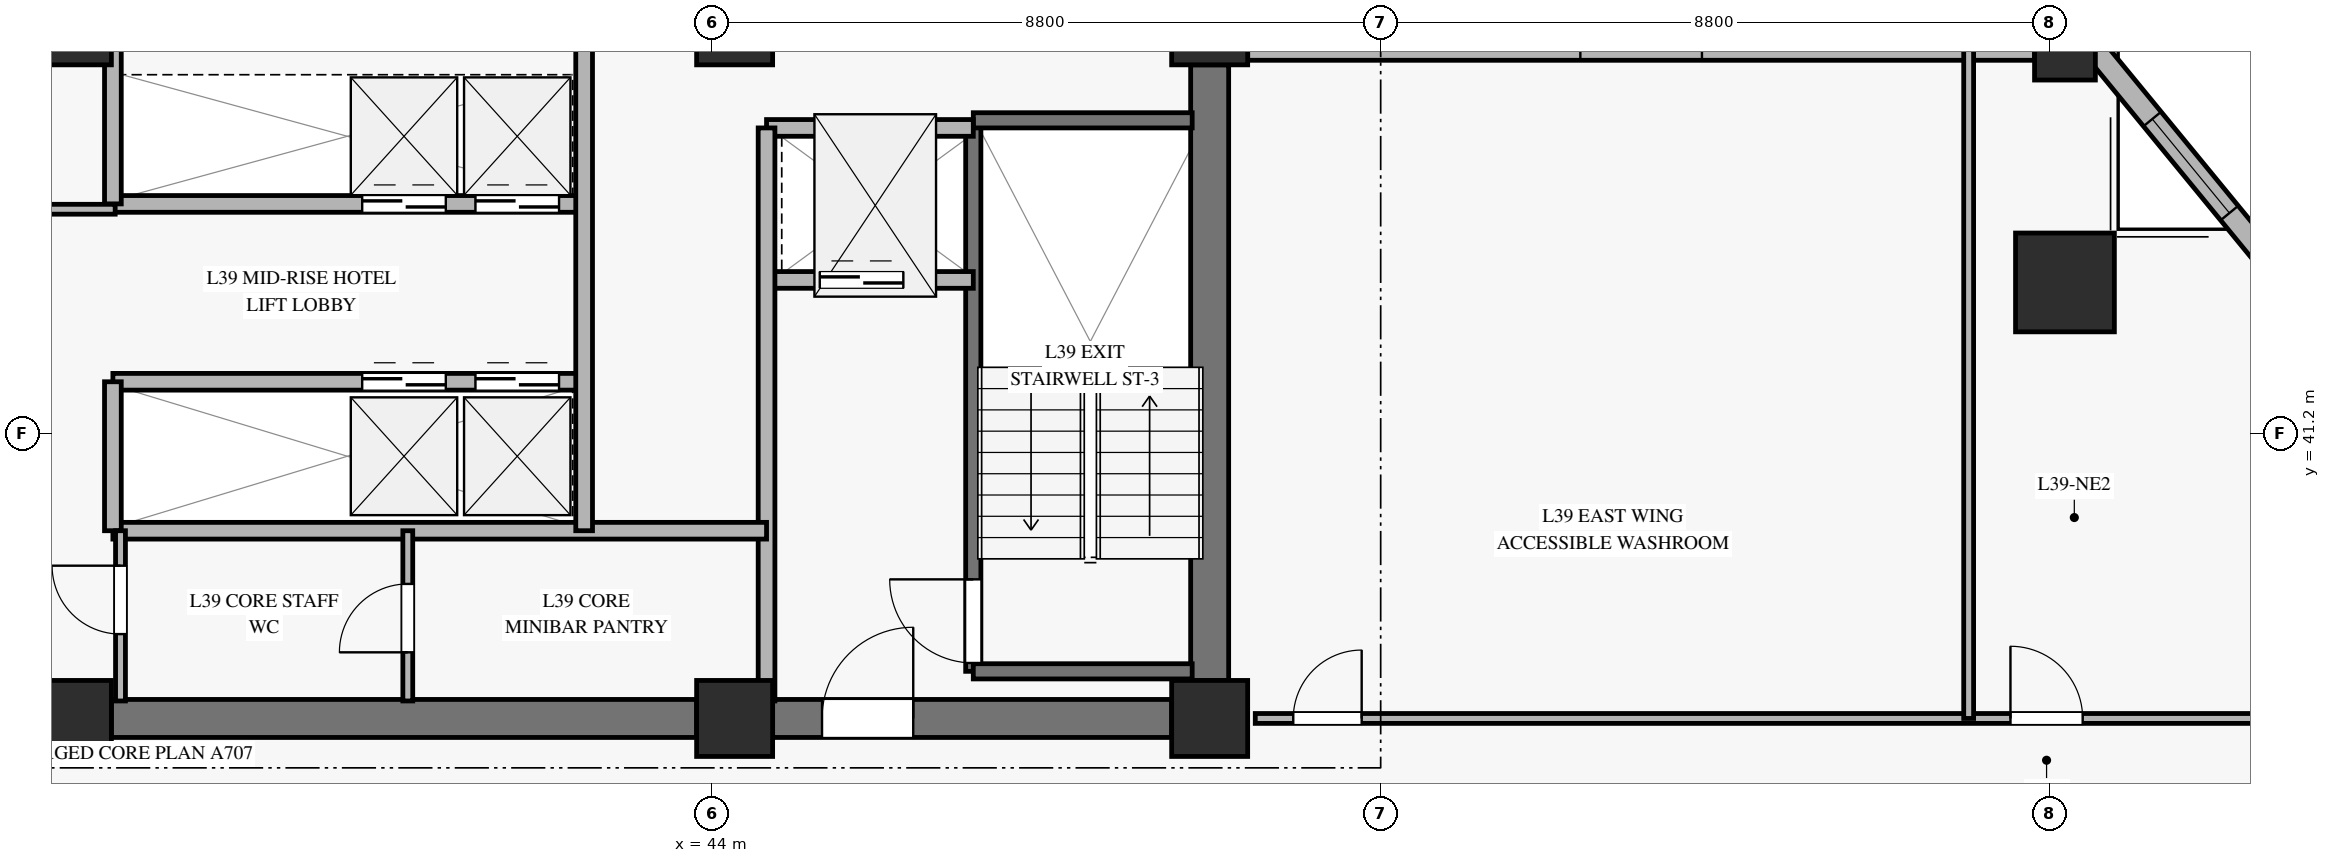
"""IFC4 building model, lengths in metres.
Left out: names, types, materials, properties, quantities, classifications, styles, units other than length and angle.
Written with IfcOpenShell. Run it as: python <this file> out.ifc"""

import sys

from ifc_helpers import new_model, si_unit, direction, frame, frame_2d, origin, origin_2d, place, context, subcontext, project, spatial, rectangle, hollow_rectangle, extrude, source, transform, mapped, element, fill, save


model = new_model("IFC4")
c1 = context("Model", 3, precision=1e-05, world=origin(), true_north=direction((0.0, 1.0)))
c2 = subcontext(c1, "Body", "Model", "MODEL_VIEW")
j1 = project(units=[si_unit("LENGTHUNIT", "METRE"), si_unit("PLANEANGLEUNIT", "RADIAN")], contexts=[c1])
p1 = place(None, origin())
s1 = spatial("IfcSite", under=j1, at=p1, CompositionType="ELEMENT")
p2 = place(p1, origin())
s2 = spatial("IfcBuilding", under=s1, at=p2, CompositionType="ELEMENT")
p3 = place(p2, frame((0.0, 0.0, 159.7)))
s3 = spatial("IfcBuildingStorey", under=s2, at=p3, CompositionType="ELEMENT", Elevation=159.7)
m1 = source(origin(), c2, "Body", "SweptSolid", [
    extrude(rectangle(XDim=1.0, YDim=1.0, at=origin_2d()), origin(), (0.0, 0.0, 1.0), 3.27),
])
for number, where, z_axis, x_axis in (
    (1, (35.6, 37.45, 0.0), (0.0, 0.0, 1.0), (1.0, 0.0, 0.0)),
    (2, (35.6, 46.55, 0.0), (0.0, 0.0, 1.0), (1.0, 0.0, 0.0)),
    (3, (44.3, 37.45, 0.0), (0.0, 0.0, 1.0), (1.0, 0.0, 0.0)),
    (4, (44.3, 46.55, 0.0), (0.0, 0.0, 1.0), (1.0, 0.0, 0.0)),
    (5, (50.55, 37.45, 0.0), (0.0, 0.0, 1.0), (1.0, 0.0, 0.0)),
    (6, (50.55, 46.55, 0.0), (0.0, 0.0, 1.0), (1.0, 0.0, 0.0)),
):
    element("IfcColumn", number, at=place(p3, frame(where, z_axis=z_axis, x_axis=x_axis)), inside=s3, PredefinedType="PILASTER", context=c2, shape_type="MappedRepresentation", body=[
        mapped(m1, transform((0.0, 0.0, 0.0), x_axis=(1.0, 0.0, 0.0), y_axis=(0.0, 1.0, 0.0), z_axis=(0.0, 0.0, 1.0), scale=1.0)),
    ])
p4 = place(p3, frame((36.1, 37.45, 0.0), z_axis=(0.0, 0.0, 1.0), x_axis=(1.0, 0.0, 0.0)))
e7 = element("IfcWall", 7, at=p4, inside=s3, PredefinedType="SHEAR", context=c2, shape_type="SweptSolid", body=[
    extrude(rectangle(XDim=7.7, YDim=0.5, at=frame_2d((3.85, 0.0))), origin(), (0.0, 0.0, 1.0), 3.27),
])
p5 = place(p3, frame((44.8, 37.45, 0.0), z_axis=(0.0, 0.0, 1.0), x_axis=(1.0, 0.0, 0.0)))
e8 = element("IfcWall", 8, at=p5, inside=s3, PredefinedType="SHEAR", context=c2, shape_type="SweptSolid", body=[
    extrude(rectangle(XDim=5.25, YDim=0.5, at=frame_2d((2.625, 0.0))), origin(), (0.0, 0.0, 1.0), 3.27),
])
p6 = place(p5, frame((0.65, 0.0, 0.0)))
e9 = element("IfcOpeningElement", 9, at=p6, cuts=e8, PredefinedType="OPENING", context=c2, shape_type="SweptSolid", body=[
    extrude(rectangle(XDim=1.2, YDim=2.15, at=frame_2d((0.6, 1.075))), frame((0.0, 0.26, 0.0), z_axis=(0.0, -1.0, 0.0), x_axis=(1.0, 0.0, 0.0)), (0.0, 0.0, 1.0), 0.52),
])
p7 = place(p3, frame((50.55, 37.95, 0.0), z_axis=(0.0, 0.0, 1.0), x_axis=(0.0, 1.0, 0.0)))
e10 = element("IfcWall", 10, at=p7, inside=s3, PredefinedType="SHEAR", context=c2, shape_type="SweptSolid", body=[
    extrude(rectangle(XDim=8.1, YDim=0.5, at=frame_2d((4.05, 0.0))), origin(), (0.0, 0.0, 1.0), 3.27),
])
m2 = source(origin(), c2, "Body", "SweptSolid", [
    extrude(hollow_rectangle(XDim=1.3, YDim=1.3, WallThickness=0.06, at=origin_2d()), origin(), (0.0, 0.0, 1.0), 3.27),
])
p8 = place(p3, frame((61.803, 43.187, 0.0), z_axis=(0.0, 0.0, 1.0), x_axis=(1.0, 0.0, 0.0)))
e11 = element("IfcColumn", 11, at=p8, inside=s3, PredefinedType="COLUMN", context=c2, shape_type="MappedRepresentation", body=[
    mapped(m2, transform((0.0, 0.0, 0.0), x_axis=(1.0, 0.0, 0.0), y_axis=(0.0, 1.0, 0.0), z_axis=(0.0, 0.0, 1.0), scale=1.0)),
])
m3 = source(origin(), c2, "Body", "SweptSolid", [
    extrude(hollow_rectangle(XDim=0.8, YDim=0.8, WallThickness=0.036, at=origin_2d()), origin(), (0.0, 0.0, 1.0), 3.27),
])
p9 = place(p3, frame((61.803, 46.25, 0.0), z_axis=(0.0, 0.0, 1.0), x_axis=(1.0, 0.0, 0.0)))
e12 = element("IfcColumn", 12, at=p9, inside=s3, PredefinedType="COLUMN", context=c2, shape_type="MappedRepresentation", body=[
    mapped(m3, transform((0.0, 0.0, 0.0), x_axis=(1.0, 0.0, 0.0), y_axis=(0.0, 1.0, 0.0), z_axis=(0.0, 0.0, 1.0), scale=1.0)),
])
p10 = place(p3, frame((51.05, 46.25, 0.0), z_axis=(0.0, 0.0, 1.0), x_axis=(1.0, 0.0, 0.0)))
e13 = element("IfcWall", 13, at=p10, inside=s3, PredefinedType="SOLIDWALL", context=c2, shape_type="SweptSolid", body=[
    extrude(rectangle(XDim=10.353, YDim=0.28, at=frame_2d((5.177, 0.0))), origin(), (0.0, 0.0, 1.0), 2.75),
])
p11 = place(p10, frame((4.377, 0.0, 0.45)))
e14 = element("IfcOpeningElement", 14, at=p11, cuts=e13, PredefinedType="OPENING", context=c2, shape_type="SweptSolid", body=[
    extrude(rectangle(XDim=1.6, YDim=2.0, at=frame_2d((0.8, 1.0))), frame((0.0, 0.15, 0.0), z_axis=(0.0, -1.0, 0.0), x_axis=(1.0, 0.0, 0.0)), (0.0, 0.0, 1.0), 0.3),
])
p12 = place(p3, frame((64.716, 43.187, 0.0), z_axis=(0.0, 0.0, 1.0), x_axis=(-0.634310946058, 0.773078019161, 0.0)))
e15 = element("IfcWall", 15, at=p12, inside=s3, PredefinedType="SOLIDWALL", context=c2, shape_type="SweptSolid", body=[
    extrude(rectangle(XDim=3.962, YDim=0.3, at=frame_2d((1.981, 0.0))), origin(), (0.0, 0.0, 1.0), 2.75),
])
p13 = place(p12, frame((1.181, 0.0, 0.45)))
e16 = element("IfcOpeningElement", 16, at=p13, cuts=e15, PredefinedType="OPENING", context=c2, shape_type="SweptSolid", body=[
    extrude(rectangle(XDim=1.6, YDim=2.0, at=frame_2d((0.8, 1.0))), frame((0.0, 0.16, 0.0), z_axis=(0.0, -1.0, 0.0), x_axis=(1.0, 0.0, 0.0)), (0.0, 0.0, 1.0), 0.32),
])
p14 = place(p3, frame((47.44, 38.07, 0.0), z_axis=(0.0, 0.0, 1.0), x_axis=(0.0, 1.0, 0.0)))
e17 = element("IfcWall", 17, at=p14, inside=s3, PredefinedType="SOLIDWALL", context=c2, shape_type="SweptSolid", body=[
    extrude(rectangle(XDim=7.25, YDim=0.2, at=frame_2d((3.625, 0.0))), origin(), (0.0, 0.0, 1.0), 3.5),
])
p15 = place(p14, frame((0.11, 0.0, 0.0)))
e18 = element("IfcOpeningElement", 18, at=p15, cuts=e17, PredefinedType="OPENING", context=c2, shape_type="SweptSolid", body=[
    extrude(rectangle(XDim=1.1, YDim=2.15, at=frame_2d((0.55, 1.075))), frame((0.0, 0.11, 0.0), z_axis=(0.0, -1.0, 0.0), x_axis=(1.0, 0.0, 0.0)), (0.0, 0.0, 1.0), 0.22),
])
for number, where, z_axis, x_axis in (
    (19, (47.44, 45.32, 0.0), (0.0, 0.0, 1.0), (1.0, 0.0, 0.0)),
    (20, (47.44, 38.07, 0.0), (0.0, 0.0, 1.0), (1.0, 0.0, 0.0)),
):
    element("IfcWall", number, at=place(p3, frame(where, z_axis=z_axis, x_axis=x_axis)), inside=s3, PredefinedType="SOLIDWALL", context=c2, shape_type="SweptSolid", body=[
        extrude(rectangle(XDim=2.88, YDim=0.2, at=frame_2d((1.44, 0.0))), origin(), (0.0, 0.0, 1.0), 3.5),
    ])
p16 = place(p3, frame((44.72, 43.22, 0.0), z_axis=(0.0, 0.0, 1.0), x_axis=(1.0, 0.0, 0.0)))
e21 = element("IfcWall", 21, at=p16, inside=s3, PredefinedType="SOLIDWALL", context=c2, shape_type="SweptSolid", body=[
    extrude(rectangle(XDim=2.72, YDim=0.22, at=frame_2d((1.36, 0.0))), origin(), (0.0, 0.0, 1.0), 3.27),
])
p17 = place(p16, frame((0.7, 0.0, 0.0)))
e22 = element("IfcOpeningElement", 22, at=p17, cuts=e21, PredefinedType="OPENING", context=c2, shape_type="SweptSolid", body=[
    extrude(rectangle(XDim=1.1, YDim=2.2, at=frame_2d((0.55, 1.1))), frame((0.0, 0.12, 0.0), z_axis=(0.0, -1.0, 0.0), x_axis=(1.0, 0.0, 0.0)), (0.0, 0.0, 1.0), 0.24),
])
p18 = place(p3, frame((44.72, 45.22, 0.0), z_axis=(0.0, 0.0, 1.0), x_axis=(1.0, 0.0, 0.0)))
e23 = element("IfcWall", 23, at=p18, inside=s3, PredefinedType="SOLIDWALL", context=c2, shape_type="SweptSolid", body=[
    extrude(rectangle(XDim=2.72, YDim=0.22, at=frame_2d((1.36, 0.0))), origin(), (0.0, 0.0, 1.0), 3.27),
])
p19 = place(p3, frame((44.72, 37.68, 0.0), z_axis=(0.0, 0.0, 1.0), x_axis=(0.0, 1.0, 0.0)))
e24 = element("IfcWall", 24, at=p19, inside=s3, PredefinedType="SOLIDWALL", context=c2, shape_type="SweptSolid", body=[
    extrude(rectangle(XDim=7.54, YDim=0.22, at=frame_2d((3.77, 0.0))), origin(), (0.0, 0.0, 1.0), 3.27),
])
p20 = place(p3, frame((36.12, 44.22, 0.0), z_axis=(0.0, 0.0, 1.0), x_axis=(1.0, 0.0, 0.0)))
e25 = element("IfcWall", 25, at=p20, inside=s3, PredefinedType="SOLIDWALL", context=c2, shape_type="SweptSolid", body=[
    extrude(rectangle(XDim=6.2, YDim=0.22, at=frame_2d((3.1, 0.0))), origin(), (0.0, 0.0, 1.0), 3.27),
])
p21 = place(p20, frame((3.28, 0.0, 0.0)))
e26 = element("IfcOpeningElement", 26, at=p21, cuts=e25, PredefinedType="OPENING", context=c2, shape_type="SweptSolid", body=[
    extrude(rectangle(XDim=1.1, YDim=2.2, at=frame_2d((0.55, 1.1))), frame((0.0, 0.12, 0.0), z_axis=(0.0, -1.0, 0.0), x_axis=(1.0, 0.0, 0.0)), (0.0, 0.0, 1.0), 0.24),
])
p22 = place(p20, frame((4.77, 0.0, 0.0)))
e27 = element("IfcOpeningElement", 27, at=p22, cuts=e25, PredefinedType="OPENING", context=c2, shape_type="SweptSolid", body=[
    extrude(rectangle(XDim=1.1, YDim=2.2, at=frame_2d((0.55, 1.1))), frame((0.0, 0.12, 0.0), z_axis=(0.0, -1.0, 0.0), x_axis=(1.0, 0.0, 0.0)), (0.0, 0.0, 1.0), 0.24),
])
p23 = place(p3, frame((36.12, 41.88, 0.0), z_axis=(0.0, 0.0, 1.0), x_axis=(1.0, 0.0, 0.0)))
e28 = element("IfcWall", 28, at=p23, inside=s3, PredefinedType="SOLIDWALL", context=c2, shape_type="SweptSolid", body=[
    extrude(rectangle(XDim=6.2, YDim=0.22, at=frame_2d((3.1, 0.0))), origin(), (0.0, 0.0, 1.0), 3.27),
])
p24 = place(p23, frame((3.28, 0.0, 0.0)))
e29 = element("IfcOpeningElement", 29, at=p24, cuts=e28, PredefinedType="OPENING", context=c2, shape_type="SweptSolid", body=[
    extrude(rectangle(XDim=1.1, YDim=2.2, at=frame_2d((0.55, 1.1))), frame((0.0, 0.12, 0.0), z_axis=(0.0, -1.0, 0.0), x_axis=(1.0, 0.0, 0.0)), (0.0, 0.0, 1.0), 0.24),
])
p25 = place(p23, frame((4.77, 0.0, 0.0)))
e30 = element("IfcOpeningElement", 30, at=p25, cuts=e28, PredefinedType="OPENING", context=c2, shape_type="SweptSolid", body=[
    extrude(rectangle(XDim=1.1, YDim=2.2, at=frame_2d((0.55, 1.1))), frame((0.0, 0.12, 0.0), z_axis=(0.0, -1.0, 0.0), x_axis=(1.0, 0.0, 0.0)), (0.0, 0.0, 1.0), 0.24),
])
p26 = place(p3, frame((36.12, 39.92, 0.0), z_axis=(0.0, 0.0, 1.0), x_axis=(1.0, 0.0, 0.0)))
e31 = element("IfcWall", 31, at=p26, inside=s3, PredefinedType="SOLIDWALL", context=c2, shape_type="SweptSolid", body=[
    extrude(rectangle(XDim=8.6, YDim=0.22, at=frame_2d((4.3, 0.0))), origin(), (0.0, 0.0, 1.0), 2.555),
])
p27 = place(p3, frame((42.32, 39.92, 0.0), z_axis=(0.0, 0.0, 1.0), x_axis=(0.0, 1.0, 0.0)))
e32 = element("IfcWall", 32, at=p27, inside=s3, PredefinedType="SOLIDWALL", context=c2, shape_type="SweptSolid", body=[
    extrude(rectangle(XDim=6.4, YDim=0.22, at=frame_2d((3.2, 0.0))), origin(), (0.0, 0.0, 1.0), 3.27),
])
p28 = place(p3, frame((36.12, 39.92, 0.0), z_axis=(0.0, 0.0, 1.0), x_axis=(0.0, 1.0, 0.0)))
e33 = element("IfcWall", 33, at=p28, inside=s3, PredefinedType="SOLIDWALL", context=c2, shape_type="SweptSolid", body=[
    extrude(rectangle(XDim=1.96, YDim=0.22, at=frame_2d((0.98, 0.0))), origin(), (0.0, 0.0, 1.0), 3.27),
])
p29 = place(p3, frame((36.12, 44.22, 0.0), z_axis=(0.0, 0.0, 1.0), x_axis=(0.0, 1.0, 0.0)))
e34 = element("IfcWall", 34, at=p29, inside=s3, PredefinedType="SOLIDWALL", context=c2, shape_type="SweptSolid", body=[
    extrude(rectangle(XDim=2.1, YDim=0.22, at=frame_2d((1.05, 0.0))), origin(), (0.0, 0.0, 1.0), 3.27),
])
p30 = place(p3, frame((33.18, 44.15, 0.0), z_axis=(0.0, 0.0, 1.0), x_axis=(1.0, 0.0, 0.0)))
e35 = element("IfcWall", 35, at=p30, inside=s3, PredefinedType="PARTITIONING", context=c2, shape_type="SweptSolid", body=[
    extrude(rectangle(XDim=2.97, YDim=0.13, at=frame_2d((1.485, 0.0))), origin(), (0.0, 0.0, 1.0), 2.555),
])
p31 = place(p3, frame((36.22, 37.68, 0.0), z_axis=(0.0, 0.0, 1.0), x_axis=(0.0, 1.0, 0.0)))
e36 = element("IfcWall", 36, at=p31, inside=s3, PredefinedType="PARTITIONING", context=c2, shape_type="SweptSolid", body=[
    extrude(rectangle(XDim=2.24, YDim=0.13, at=frame_2d((1.12, 0.0))), origin(), (0.0, 0.0, 1.0), 3.27),
])
p32 = place(p31, frame((0.88, 0.0, 0.0)))
e37 = element("IfcOpeningElement", 37, at=p32, cuts=e36, PredefinedType="OPENING", context=c2, shape_type="SweptSolid", body=[
    extrude(rectangle(XDim=0.9, YDim=2.1, at=frame_2d((0.45, 1.05))), frame((0.0, 0.075, 0.0), z_axis=(0.0, -1.0, 0.0), x_axis=(1.0, 0.0, 0.0)), (0.0, 0.0, 1.0), 0.15),
])
p33 = place(p3, frame((40.0, 37.68, 0.0), z_axis=(0.0, 0.0, 1.0), x_axis=(0.0, 1.0, 0.0)))
e38 = element("IfcWall", 38, at=p33, inside=s3, PredefinedType="PARTITIONING", context=c2, shape_type="SweptSolid", body=[
    extrude(rectangle(XDim=2.24, YDim=0.13, at=frame_2d((1.12, 0.0))), origin(), (0.0, 0.0, 1.0), 3.27),
])
p34 = place(p33, frame((0.64, 0.0, 0.0)))
e39 = element("IfcOpeningElement", 39, at=p34, cuts=e38, PredefinedType="OPENING", context=c2, shape_type="SweptSolid", body=[
    extrude(rectangle(XDim=0.9, YDim=2.1, at=frame_2d((0.45, 1.05))), frame((0.0, 0.075, 0.0), z_axis=(0.0, -1.0, 0.0), x_axis=(1.0, 0.0, 0.0)), (0.0, 0.0, 1.0), 0.15),
])
p35 = place(p3, frame((51.15, 37.45, 0.0), z_axis=(0.0, 0.0, 1.0), x_axis=(1.0, 0.0, 0.0)))
e40 = element("IfcWall", 40, at=p35, inside=s3, PredefinedType="PARTITIONING", context=c2, shape_type="SweptSolid", body=[
    extrude(rectangle(XDim=13.566, YDim=0.13, at=frame_2d((6.783, 0.0))), origin(), (0.0, 0.0, 1.0), 2.755),
])
p36 = place(p35, frame((0.5, 0.0, 0.0)))
e41 = element("IfcOpeningElement", 41, at=p36, cuts=e40, PredefinedType="OPENING", context=c2, shape_type="SweptSolid", body=[
    extrude(rectangle(XDim=0.9, YDim=2.1, at=frame_2d((0.45, 1.05))), frame((0.0, 0.075, 0.0), z_axis=(0.0, -1.0, 0.0), x_axis=(1.0, 0.0, 0.0)), (0.0, 0.0, 1.0), 0.15),
])
p37 = place(p35, frame((9.936, 0.0, 0.0)))
e42 = element("IfcOpeningElement", 42, at=p37, cuts=e40, PredefinedType="OPENING", context=c2, shape_type="SweptSolid", body=[
    extrude(rectangle(XDim=0.95, YDim=2.1, at=frame_2d((0.475, 1.05))), frame((0.0, 0.075, 0.0), z_axis=(0.0, -1.0, 0.0), x_axis=(1.0, 0.0, 0.0)), (0.0, 0.0, 1.0), 0.15),
])
p38 = place(p3, frame((60.536, 37.45, 0.0), z_axis=(0.0, 0.0, 1.0), x_axis=(0.0, 1.0, 0.0)))
e43 = element("IfcWall", 43, at=p38, inside=s3, PredefinedType="PARTITIONING", context=c2, shape_type="SweptSolid", body=[
    extrude(rectangle(XDim=8.8, YDim=0.13, at=frame_2d((4.4, 0.0))), origin(), (0.0, 0.0, 1.0), 3.27),
])
m4 = source(origin(), c2, "Body", "SweptSolid", [
    extrude(rectangle(XDim=1.6, YDim=2.0, at=frame_2d((0.8, 1.0))), frame((0.0, 0.03, 0.0), z_axis=(0.0, -1.0, 0.0), x_axis=(1.0, 0.0, 0.0)), (0.0, 0.0, 1.0), 0.06),
])
p39 = place(p13, origin())
e44 = element("IfcWindow", 44, at=p39, inside=s3, PartitioningType="SINGLE_PANEL", PredefinedType="WINDOW", context=c2, shape_type="MappedRepresentation", body=[
    mapped(m4, transform((0.0, 0.0, 0.0), x_axis=(1.0, 0.0, 0.0), y_axis=(0.0, 1.0, 0.0), z_axis=(0.0, 0.0, 1.0), scale=1.0)),
])
fill(e16, e44)
m5 = source(origin(), c2, "Body", "SweptSolid", [
    extrude(rectangle(XDim=1.1, YDim=2.15, at=frame_2d((0.55, 1.075))), frame((0.0, 0.025, 0.0), z_axis=(0.0, -1.0, 0.0), x_axis=(1.0, 0.0, 0.0)), (0.0, 0.0, 1.0), 0.05),
])
p40 = place(p15, origin())
e45 = element("IfcDoor", 45, at=p40, inside=s3, OperationType="SINGLE_SWING_RIGHT", PredefinedType="DOOR", context=c2, shape_type="MappedRepresentation", body=[
    mapped(m5, transform((0.0, 0.0, 0.0), x_axis=(1.0, 0.0, 0.0), y_axis=(0.0, 1.0, 0.0), z_axis=(0.0, 0.0, 1.0), scale=1.0)),
])
fill(e18, e45)
m6 = source(origin(), c2, "Body", "SweptSolid", [
    extrude(rectangle(XDim=1.1, YDim=2.2, at=frame_2d((0.55, 1.1))), frame((0.0, 0.025, 0.0), z_axis=(0.0, -1.0, 0.0), x_axis=(1.0, 0.0, 0.0)), (0.0, 0.0, 1.0), 0.05),
])
p41 = place(p17, origin())
e46 = element("IfcDoor", 46, at=p41, inside=s3, OperationType="SLIDING_TO_LEFT", PredefinedType="DOOR", context=c2, shape_type="MappedRepresentation", body=[
    mapped(m6, transform((0.0, 0.0, 0.0), x_axis=(1.0, 0.0, 0.0), y_axis=(0.0, 1.0, 0.0), z_axis=(0.0, 0.0, 1.0), scale=1.0)),
])
fill(e22, e46)
m7 = source(origin(), c2, "Body", "SweptSolid", [
    extrude(rectangle(XDim=1.2, YDim=2.15, at=frame_2d((0.6, 1.075))), frame((0.0, 0.025, 0.0), z_axis=(0.0, -1.0, 0.0), x_axis=(1.0, 0.0, 0.0)), (0.0, 0.0, 1.0), 0.05),
])
p42 = place(p6, origin())
e47 = element("IfcDoor", 47, at=p42, inside=s3, OperationType="SINGLE_SWING_RIGHT", PredefinedType="DOOR", context=c2, shape_type="MappedRepresentation", body=[
    mapped(m7, transform((0.0, 0.0, 0.0), x_axis=(1.0, 0.0, 0.0), y_axis=(0.0, 1.0, 0.0), z_axis=(0.0, 0.0, 1.0), scale=1.0)),
])
fill(e9, e47)
p43 = place(p21, origin())
e48 = element("IfcDoor", 48, at=p43, inside=s3, OperationType="SLIDING_TO_LEFT", PredefinedType="DOOR", context=c2, shape_type="MappedRepresentation", body=[
    mapped(m6, transform((0.0, 0.0, 0.0), x_axis=(1.0, 0.0, 0.0), y_axis=(0.0, 1.0, 0.0), z_axis=(0.0, 0.0, 1.0), scale=1.0)),
])
fill(e26, e48)
p44 = place(p22, origin())
e49 = element("IfcDoor", 49, at=p44, inside=s3, OperationType="SLIDING_TO_LEFT", PredefinedType="DOOR", context=c2, shape_type="MappedRepresentation", body=[
    mapped(m6, transform((0.0, 0.0, 0.0), x_axis=(1.0, 0.0, 0.0), y_axis=(0.0, 1.0, 0.0), z_axis=(0.0, 0.0, 1.0), scale=1.0)),
])
fill(e27, e49)
p45 = place(p24, origin())
e50 = element("IfcDoor", 50, at=p45, inside=s3, OperationType="SLIDING_TO_LEFT", PredefinedType="DOOR", context=c2, shape_type="MappedRepresentation", body=[
    mapped(m6, transform((0.0, 0.0, 0.0), x_axis=(1.0, 0.0, 0.0), y_axis=(0.0, 1.0, 0.0), z_axis=(0.0, 0.0, 1.0), scale=1.0)),
])
fill(e29, e50)
p46 = place(p25, origin())
e51 = element("IfcDoor", 51, at=p46, inside=s3, OperationType="SLIDING_TO_LEFT", PredefinedType="DOOR", context=c2, shape_type="MappedRepresentation", body=[
    mapped(m6, transform((0.0, 0.0, 0.0), x_axis=(1.0, 0.0, 0.0), y_axis=(0.0, 1.0, 0.0), z_axis=(0.0, 0.0, 1.0), scale=1.0)),
])
fill(e30, e51)
m8 = source(origin(), c2, "Body", "SweptSolid", [
    extrude(rectangle(XDim=0.9, YDim=2.1, at=frame_2d((0.45, 1.05))), frame((0.0, 0.025, 0.0), z_axis=(0.0, -1.0, 0.0), x_axis=(1.0, 0.0, 0.0)), (0.0, 0.0, 1.0), 0.05),
])
p47 = place(p32, origin())
e52 = element("IfcDoor", 52, at=p47, inside=s3, OperationType="SINGLE_SWING_RIGHT", PredefinedType="DOOR", context=c2, shape_type="MappedRepresentation", body=[
    mapped(m8, transform((0.0, 0.0, 0.0), x_axis=(1.0, 0.0, 0.0), y_axis=(0.0, 1.0, 0.0), z_axis=(0.0, 0.0, 1.0), scale=1.0)),
])
fill(e37, e52)
p48 = place(p34, origin())
e53 = element("IfcDoor", 53, at=p48, inside=s3, OperationType="SINGLE_SWING_LEFT", PredefinedType="DOOR", context=c2, shape_type="MappedRepresentation", body=[
    mapped(m8, transform((0.0, 0.0, 0.0), x_axis=(1.0, 0.0, 0.0), y_axis=(0.0, 1.0, 0.0), z_axis=(0.0, 0.0, 1.0), scale=1.0)),
])
fill(e39, e53)
p49 = place(p36, origin())
e54 = element("IfcDoor", 54, at=p49, inside=s3, OperationType="SINGLE_SWING_RIGHT", PredefinedType="DOOR", context=c2, shape_type="MappedRepresentation", body=[
    mapped(m8, transform((0.0, 0.0, 0.0), x_axis=(1.0, 0.0, 0.0), y_axis=(0.0, 1.0, 0.0), z_axis=(0.0, 0.0, 1.0), scale=1.0)),
])
fill(e41, e54)
m9 = source(origin(), c2, "Body", "SweptSolid", [
    extrude(rectangle(XDim=0.95, YDim=2.1, at=frame_2d((0.475, 1.05))), frame((0.0, 0.025, 0.0), z_axis=(0.0, -1.0, 0.0), x_axis=(1.0, 0.0, 0.0)), (0.0, 0.0, 1.0), 0.05),
])
p50 = place(p37, origin())
e55 = element("IfcDoor", 55, at=p50, inside=s3, OperationType="SINGLE_SWING_LEFT", PredefinedType="DOOR", context=c2, shape_type="MappedRepresentation", body=[
    mapped(m9, transform((0.0, 0.0, 0.0), x_axis=(1.0, 0.0, 0.0), y_axis=(0.0, 1.0, 0.0), z_axis=(0.0, 0.0, 1.0), scale=1.0)),
])
fill(e42, e55)
save(model, sys.argv[1])
